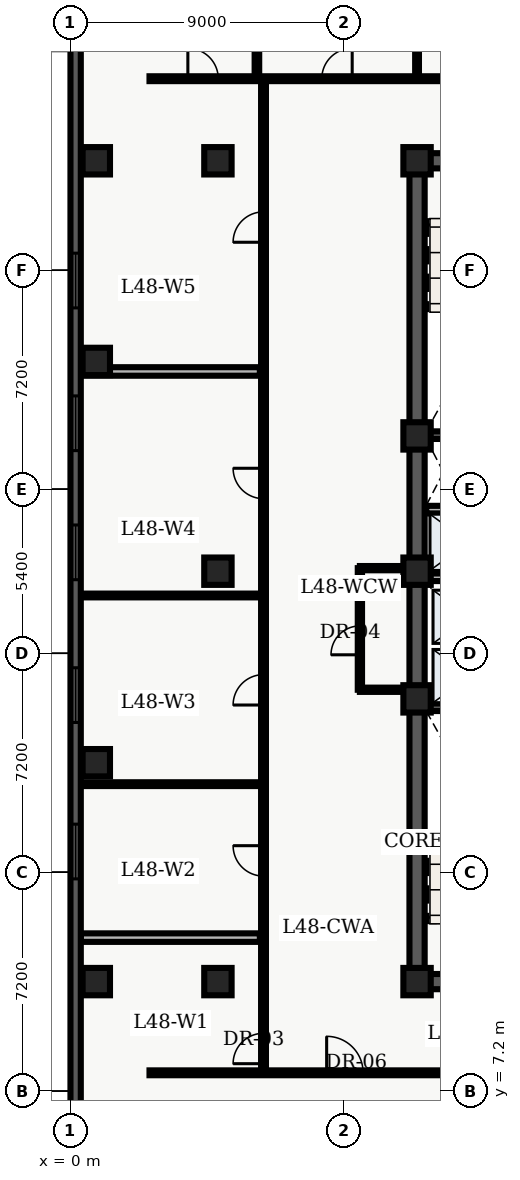
"""IFC4 building model, lengths in metres.
Left out: names, types, materials, properties, quantities, classifications, styles, units other than length and angle.
Written with IfcOpenShell. Run it as: python <this file> out.ifc"""

import sys

from ifc_helpers import new_model, entity, si_unit, converted_unit, direction, frame, origin_with_axes, origin_2d_with_axis, place, context, subcontext, project, spatial, polyline, rectangle, outline, extrude, element, fill, save


model = new_model("IFC4")
c1 = context("Model", 3, precision=1e-05, world=origin_with_axes(), true_north=direction((0.0, 1.0)))
c2 = subcontext(c1, "Body", "Model", "MODEL_VIEW")
j1 = project(units=[si_unit("LENGTHUNIT", "METRE"), converted_unit("PLANEANGLEUNIT", "DEGREE", entity("IfcPlaneAngleMeasure", 0.017), si_unit("PLANEANGLEUNIT", "RADIAN"), dimensions=[0, 0, 0, 0, 0, 0, 0])], contexts=[c1])
p1 = place(None, origin_with_axes())
s1 = spatial("IfcSite", under=j1, at=p1, CompositionType="ELEMENT")
p2 = place(p1, origin_with_axes())
s2 = spatial("IfcBuilding", under=s1, at=p2, CompositionType="ELEMENT")
p3 = place(p2, frame((0.0, 0.0, 196.5), z_axis=(0.0, 0.0, 1.0), x_axis=(1.0, 0.0, 0.0)))
s3 = spatial("IfcBuildingStorey", under=s2, at=p3, CompositionType="ELEMENT", Elevation=196.5)
p4 = place(p3, frame((11.4, 10.8, 0.0), z_axis=(0.0, 0.0, 1.0), x_axis=(0.0, 1.0, 0.0)))
e1 = element("IfcWall", 1, at=p4, inside=s3, PredefinedType="SHEAR", context=c2, shape_type="SweptSolid", body=[
    extrude(outline(polyline([(0.0, -0.25), (27.0, -0.25), (27.0, 0.25), (0.0, 0.25), (0.0, -0.25)])), origin_with_axes(), (0.0, 0.0, 1.0), 3.66),
])
p5 = place(p3, frame((11.4, 10.8, 0.0), z_axis=(0.0, 0.0, 1.0), x_axis=(1.0, 0.0, 0.0)))
e2 = element("IfcWall", 2, at=p5, inside=s3, PredefinedType="SHEAR", context=c2, shape_type="SweptSolid", body=[
    extrude(outline(polyline([(0.0, -0.25), (7.2, -0.25), (7.2, 0.25), (0.0, 0.25), (0.0, -0.25)])), origin_with_axes(), (0.0, 0.0, 1.0), 3.66),
])
p6 = place(p5, frame((2.625, 0.0, 0.0), z_axis=(0.0, 0.0, 1.0), x_axis=(1.0, 0.0, 0.0)))
e3 = element("IfcOpeningElement", 3, at=p6, cuts=e2, PredefinedType="OPENING", context=c2, shape_type="SweptSolid", body=[
    extrude(rectangle(XDim=1.05, YDim=0.52, at=origin_2d_with_axis()), origin_with_axes(), (0.0, 0.0, 1.0), 2.15),
])
p7 = place(p3, frame((11.4, 37.8, 0.0), z_axis=(0.0, 0.0, 1.0), x_axis=(1.0, 0.0, 0.0)))
e4 = element("IfcWall", 4, at=p7, inside=s3, PredefinedType="SHEAR", context=c2, shape_type="SweptSolid", body=[
    extrude(outline(polyline([(0.0, -0.25), (7.2, -0.25), (7.2, 0.25), (0.0, 0.25), (0.0, -0.25)])), origin_with_axes(), (0.0, 0.0, 1.0), 3.66),
])
p8 = place(p7, frame((2.625, 0.0, 0.0), z_axis=(0.0, 0.0, 1.0), x_axis=(1.0, 0.0, 0.0)))
e5 = element("IfcOpeningElement", 5, at=p8, cuts=e4, PredefinedType="OPENING", context=c2, shape_type="SweptSolid", body=[
    extrude(rectangle(XDim=1.05, YDim=0.52, at=origin_2d_with_axis()), origin_with_axes(), (0.0, 0.0, 1.0), 2.15),
])
for number, where, z_axis, x_axis in (
    (6, (11.65, 19.825, 0.0), (0.0, 0.0, 1.0), (1.0, 0.0, 0.0)),
    (7, (11.65, 28.775, 0.0), (0.0, 0.0, 1.0), (1.0, 0.0, 0.0)),
):
    element("IfcWall", number, at=place(p3, frame(where, z_axis=z_axis, x_axis=x_axis)), inside=s3, PredefinedType="SHEAR", context=c2, shape_type="SweptSolid", body=[
        extrude(outline(polyline([(0.0, -0.125), (6.7, -0.125), (6.7, 0.125), (0.0, 0.125), (0.0, -0.125)])), origin_with_axes(), (0.0, 0.0, 1.0), 3.66),
    ])
p9 = place(p3, frame((11.7, 24.1, 0.0), z_axis=(0.0, 0.0, 1.0), x_axis=(1.0, 0.0, 0.0)))
e8 = element("IfcWall", 8, at=p9, inside=s3, PredefinedType="SOLIDWALL", context=c2, shape_type="SweptSolid", body=[
    extrude(outline(polyline([(0.0, -0.125), (6.6, -0.125), (6.6, 0.125), (0.0, 0.125), (0.0, -0.125)])), origin_with_axes(), (0.0, 0.0, 1.0), 2.7),
])
p10 = place(p9, frame((3.75, 0.0, 0.0), z_axis=(0.0, 0.0, 1.0), x_axis=(1.0, 0.0, 0.0)))
e9 = element("IfcOpeningElement", 9, at=p10, cuts=e8, PredefinedType="OPENING", context=c2, shape_type="SweptSolid", body=[
    extrude(rectangle(XDim=0.9, YDim=0.27, at=origin_2d_with_axis()), origin_with_axes(), (0.0, 0.0, 1.0), 2.15),
])
p11 = place(p3, frame((11.7, 26.325, 0.0), z_axis=(0.0, 0.0, 1.0), x_axis=(1.0, 0.0, 0.0)))
e10 = element("IfcWall", 10, at=p11, inside=s3, PredefinedType="SOLIDWALL", context=c2, shape_type="SweptSolid", body=[
    extrude(outline(polyline([(0.0, -0.125), (6.6, -0.125), (6.6, 0.125), (0.0, 0.125), (0.0, -0.125)])), origin_with_axes(), (0.0, 0.0, 1.0), 2.7),
])
p12 = place(p11, frame((3.5, 0.0, 0.0), z_axis=(0.0, 0.0, 1.0), x_axis=(1.0, 0.0, 0.0)))
e11 = element("IfcOpeningElement", 11, at=p12, cuts=e10, PredefinedType="OPENING", context=c2, shape_type="SweptSolid", body=[
    extrude(rectangle(XDim=0.9, YDim=0.27, at=origin_2d_with_axis()), origin_with_axes(), (0.0, 0.0, 1.0), 2.15),
])
for number, where, z_axis, x_axis in (
    (12, (11.4, 10.8, 0.0), (0.0, 0.0, 1.0), (1.0, 0.0, 0.0)),
    (13, (11.4, 20.1, 0.0), (0.0, 0.0, 1.0), (1.0, 0.0, 0.0)),
    (14, (11.4, 24.3, 0.0), (0.0, 0.0, 1.0), (1.0, 0.0, 0.0)),
    (15, (11.4, 28.75, 0.0), (0.0, 0.0, 1.0), (1.0, 0.0, 0.0)),
    (16, (11.4, 37.8, 0.0), (0.0, 0.0, 1.0), (1.0, 0.0, 0.0)),
    (17, (4.85, 10.8, 0.0), (0.0, 0.0, 1.0), (1.0, 0.0, 0.0)),
    (18, (4.85, 24.3, 0.0), (0.0, 0.0, 1.0), (1.0, 0.0, 0.0)),
    (19, (4.85, 37.8, 0.0), (0.0, 0.0, 1.0), (1.0, 0.0, 0.0)),
    (20, (0.85, 10.8, 0.0), (0.0, 0.0, 1.0), (1.0, 0.0, 0.0)),
    (21, (0.85, 18.0, 0.0), (0.0, 0.0, 1.0), (1.0, 0.0, 0.0)),
    (22, (0.85, 31.2, 0.0), (0.0, 0.0, 1.0), (1.0, 0.0, 0.0)),
    (23, (0.85, 37.8, 0.0), (0.0, 0.0, 1.0), (1.0, 0.0, 0.0)),
):
    element("IfcColumn", number, at=place(p3, frame(where, z_axis=z_axis, x_axis=x_axis)), inside=s3, PredefinedType="COLUMN", context=c2, shape_type="SweptSolid", body=[
        extrude(rectangle(XDim=0.9, YDim=0.9, at=origin_2d_with_axis()), origin_with_axes(), (0.0, 0.0, 1.0), 3.9),
    ])
p13 = place(p3, frame((9.52, 20.4, 0.0), z_axis=(0.0, 0.0, 1.0), x_axis=(0.0, 1.0, 0.0)))
e24 = element("IfcWall", 24, at=p13, inside=s3, PredefinedType="PARTITIONING", context=c2, shape_type="SweptSolid", body=[
    extrude(outline(polyline([(0.0, -0.07), (4.0, -0.07), (4.0, 0.07), (0.0, 0.07), (0.0, -0.07)])), origin_with_axes(), (0.0, 0.0, 1.0), 2.7),
])
p14 = place(p13, frame((1.625, 0.0, 0.0), z_axis=(0.0, 0.0, 1.0), x_axis=(1.0, 0.0, 0.0)))
e25 = element("IfcOpeningElement", 25, at=p14, cuts=e24, PredefinedType="OPENING", context=c2, shape_type="SweptSolid", body=[
    extrude(rectangle(XDim=0.95, YDim=0.16, at=origin_2d_with_axis()), origin_with_axes(), (0.0, 0.0, 1.0), 2.15),
])
for number, where, z_axis, x_axis in (
    (26, (9.52, 20.4, 0.0), (0.0, 0.0, 1.0), (1.0, 0.0, 0.0)),
    (27, (9.52, 24.4, 0.0), (0.0, 0.0, 1.0), (1.0, 0.0, 0.0)),
):
    element("IfcWall", number, at=place(p3, frame(where, z_axis=z_axis, x_axis=x_axis)), inside=s3, PredefinedType="PARTITIONING", context=c2, shape_type="SweptSolid", body=[
        extrude(outline(polyline([(0.0, -0.07), (1.58, -0.07), (1.58, 0.07), (0.0, 0.07), (0.0, -0.07)])), origin_with_axes(), (0.0, 0.0, 1.0), 2.7),
    ])
p15 = place(p3, frame((2.6, 7.8, 0.0), z_axis=(0.0, 0.0, 1.0), x_axis=(1.0, 0.0, 0.0)))
e28 = element("IfcWall", 28, at=p15, inside=s3, PredefinedType="PARTITIONING", context=c2, shape_type="SweptSolid", body=[
    extrude(outline(polyline([(0.0, -0.08), (18.55, -0.08), (18.55, 0.08), (0.0, 0.08), (0.0, -0.08)])), origin_with_axes(), (0.0, 0.0, 1.0), 2.7),
])
p16 = place(p15, frame((6.426, 0.0, 0.0), z_axis=(0.0, 0.0, 1.0), x_axis=(1.0, 0.0, 0.0)))
e29 = element("IfcOpeningElement", 29, at=p16, cuts=e28, PredefinedType="OPENING", context=c2, shape_type="SweptSolid", body=[
    extrude(rectangle(XDim=1.2, YDim=0.18, at=origin_2d_with_axis()), origin_with_axes(), (0.0, 0.0, 1.0), 2.2),
])
p17 = place(p15, frame((15.681, 0.0, 0.0), z_axis=(0.0, 0.0, 1.0), x_axis=(1.0, 0.0, 0.0)))
e30 = element("IfcOpeningElement", 30, at=p17, cuts=e28, PredefinedType="OPENING", context=c2, shape_type="SweptSolid", body=[
    extrude(rectangle(XDim=1.0, YDim=0.18, at=origin_2d_with_axis()), origin_with_axes(), (0.0, 0.0, 1.0), 2.15),
])
p18 = place(p3, frame((2.6, 40.5, 0.0), z_axis=(0.0, 0.0, 1.0), x_axis=(1.0, 0.0, 0.0)))
e31 = element("IfcWall", 31, at=p18, inside=s3, PredefinedType="PARTITIONING", context=c2, shape_type="SweptSolid", body=[
    extrude(outline(polyline([(0.0, -0.08), (25.444, -0.08), (25.444, 0.08), (0.0, 0.08), (0.0, -0.08)])), origin_with_axes(), (0.0, 0.0, 1.0), 2.7),
])
p19 = place(p18, frame((1.762, 0.0, 0.0), z_axis=(0.0, 0.0, 1.0), x_axis=(1.0, 0.0, 0.0)))
e32 = element("IfcOpeningElement", 32, at=p19, cuts=e31, PredefinedType="OPENING", context=c2, shape_type="SweptSolid", body=[
    extrude(rectangle(XDim=1.0, YDim=0.18, at=origin_2d_with_axis()), origin_with_axes(), (0.0, 0.0, 1.0), 2.15),
])
p20 = place(p18, frame((6.167, 0.0, 0.0), z_axis=(0.0, 0.0, 1.0), x_axis=(1.0, 0.0, 0.0)))
e33 = element("IfcOpeningElement", 33, at=p20, cuts=e31, PredefinedType="OPENING", context=c2, shape_type="SweptSolid", body=[
    extrude(rectangle(XDim=1.0, YDim=0.18, at=origin_2d_with_axis()), origin_with_axes(), (0.0, 0.0, 1.0), 2.15),
])
p21 = place(p18, frame((10.413, 0.0, 0.0), z_axis=(0.0, 0.0, 1.0), x_axis=(1.0, 0.0, 0.0)))
e34 = element("IfcOpeningElement", 34, at=p21, cuts=e31, PredefinedType="OPENING", context=c2, shape_type="SweptSolid", body=[
    extrude(rectangle(XDim=1.0, YDim=0.18, at=origin_2d_with_axis()), origin_with_axes(), (0.0, 0.0, 1.0), 2.15),
])
p22 = place(p18, frame((14.773, 0.0, 0.0), z_axis=(0.0, 0.0, 1.0), x_axis=(1.0, 0.0, 0.0)))
e35 = element("IfcOpeningElement", 35, at=p22, cuts=e31, PredefinedType="OPENING", context=c2, shape_type="SweptSolid", body=[
    extrude(rectangle(XDim=1.0, YDim=0.18, at=origin_2d_with_axis()), origin_with_axes(), (0.0, 0.0, 1.0), 2.15),
])
p23 = place(p3, frame((6.35, 7.8, 0.0), z_axis=(0.0, 0.0, 1.0), x_axis=(0.0, 1.0, 0.0)))
e36 = element("IfcWall", 36, at=p23, inside=s3, PredefinedType="PARTITIONING", context=c2, shape_type="SweptSolid", body=[
    extrude(outline(polyline([(0.0, -0.08), (32.7, -0.08), (32.7, 0.08), (0.0, 0.08), (0.0, -0.08)])), origin_with_axes(), (0.0, 0.0, 1.0), 2.7),
])
p24 = place(p23, frame((0.8, 0.0, 0.0), z_axis=(0.0, 0.0, 1.0), x_axis=(1.0, 0.0, 0.0)))
e37 = element("IfcOpeningElement", 37, at=p24, cuts=e36, PredefinedType="OPENING", context=c2, shape_type="SweptSolid", body=[
    extrude(rectangle(XDim=1.0, YDim=0.18, at=origin_2d_with_axis()), origin_with_axes(), (0.0, 0.0, 1.0), 2.15),
])
p25 = place(p23, frame((6.971, 0.0, 0.0), z_axis=(0.0, 0.0, 1.0), x_axis=(1.0, 0.0, 0.0)))
e38 = element("IfcOpeningElement", 38, at=p25, cuts=e36, PredefinedType="OPENING", context=c2, shape_type="SweptSolid", body=[
    extrude(rectangle(XDim=1.0, YDim=0.18, at=origin_2d_with_axis()), origin_with_axes(), (0.0, 0.0, 1.0), 2.15),
])
p26 = place(p23, frame((12.598, 0.0, 0.0), z_axis=(0.0, 0.0, 1.0), x_axis=(1.0, 0.0, 0.0)))
e39 = element("IfcOpeningElement", 39, at=p26, cuts=e36, PredefinedType="OPENING", context=c2, shape_type="SweptSolid", body=[
    extrude(rectangle(XDim=1.0, YDim=0.18, at=origin_2d_with_axis()), origin_with_axes(), (0.0, 0.0, 1.0), 2.15),
])
p27 = place(p23, frame((19.386, 0.0, 0.0), z_axis=(0.0, 0.0, 1.0), x_axis=(1.0, 0.0, 0.0)))
e40 = element("IfcOpeningElement", 40, at=p27, cuts=e36, PredefinedType="OPENING", context=c2, shape_type="SweptSolid", body=[
    extrude(rectangle(XDim=1.0, YDim=0.18, at=origin_2d_with_axis()), origin_with_axes(), (0.0, 0.0, 1.0), 2.15),
])
p28 = place(p23, frame((27.82, 0.0, 0.0), z_axis=(0.0, 0.0, 1.0), x_axis=(1.0, 0.0, 0.0)))
e41 = element("IfcOpeningElement", 41, at=p28, cuts=e36, PredefinedType="OPENING", context=c2, shape_type="SweptSolid", body=[
    extrude(rectangle(XDim=1.0, YDim=0.18, at=origin_2d_with_axis()), origin_with_axes(), (0.0, 0.0, 1.0), 2.15),
])
p29 = place(p3, frame((0.335, 12.247, 0.0), z_axis=(0.0, 0.0, 1.0), x_axis=(1.0, 0.0, 0.0)))
e42 = element("IfcWall", 42, at=p29, inside=s3, PredefinedType="PARTITIONING", context=c2, shape_type="SweptSolid", body=[
    extrude(outline(polyline([(0.0, -0.14), (5.895, -0.14), (5.895, 0.14), (0.0, 0.14), (0.0, -0.14)])), origin_with_axes(), (0.0, 0.0, 1.0), 2.7),
])
for number, where, z_axis, x_axis in (
    (43, (0.335, 17.295, 0.0), (0.0, 0.0, 1.0), (1.0, 0.0, 0.0)),
    (44, (0.335, 23.501, 0.0), (0.0, 0.0, 1.0), (1.0, 0.0, 0.0)),
):
    element("IfcWall", number, at=place(p3, frame(where, z_axis=z_axis, x_axis=x_axis)), inside=s3, PredefinedType="PARTITIONING", context=c2, shape_type="SweptSolid", body=[
        extrude(outline(polyline([(0.0, -0.062), (5.895, -0.062), (5.895, 0.062), (0.0, 0.062), (0.0, -0.062)])), origin_with_axes(), (0.0, 0.0, 1.0), 2.7),
    ])
p30 = place(p3, frame((0.335, 30.87, 0.0), z_axis=(0.0, 0.0, 1.0), x_axis=(1.0, 0.0, 0.0)))
e45 = element("IfcWall", 45, at=p30, inside=s3, PredefinedType="PARTITIONING", context=c2, shape_type="SweptSolid", body=[
    extrude(outline(polyline([(0.0, -0.14), (5.895, -0.14), (5.895, 0.14), (0.0, 0.14), (0.0, -0.14)])), origin_with_axes(), (0.0, 0.0, 1.0), 2.7),
])
p31 = place(p3, frame((6.133, 40.6, 0.0), z_axis=(0.0, 0.0, 1.0), x_axis=(0.0, 1.0, 0.0)))
e46 = element("IfcWall", 46, at=p31, inside=s3, PredefinedType="PARTITIONING", context=c2, shape_type="SweptSolid", body=[
    extrude(outline(polyline([(0.0, -0.075), (7.665, -0.075), (7.665, 0.075), (0.0, 0.075), (0.0, -0.075)])), origin_with_axes(), (0.0, 0.0, 1.0), 2.7),
])
p32 = place(p3, frame((11.4, 40.6, 0.0), z_axis=(0.0, 0.0, 1.0), x_axis=(0.0, 1.0, 0.0)))
e47 = element("IfcWall", 47, at=p32, inside=s3, PredefinedType="PARTITIONING", context=c2, shape_type="SweptSolid", body=[
    extrude(outline(polyline([(0.0, -0.062), (7.665, -0.062), (7.665, 0.062), (0.0, 0.062), (0.0, -0.062)])), origin_with_axes(), (0.0, 0.0, 1.0), 2.7),
])
p33 = place(p3, frame((0.17, 2.74, 0.0), z_axis=(0.0, 0.0, 1.0), x_axis=(0.0, 1.0, 0.0)))
e48 = element("IfcWall", 48, at=p33, inside=s3, PredefinedType="SOLIDWALL", context=c2, shape_type="SweptSolid", body=[
    extrude(outline(polyline([(0.0, -0.17), (43.46, -0.17), (43.46, 0.17), (0.0, 0.17), (0.0, -0.17)])), origin_with_axes(), (0.0, 0.0, 1.0), 3.66),
])
p34 = place(p33, frame((2.948, 0.0, 0.45), z_axis=(0.0, 0.0, 1.0), x_axis=(1.0, 0.0, 0.0)))
e49 = element("IfcOpeningElement", 49, at=p34, cuts=e48, PredefinedType="OPENING", context=c2, shape_type="SweptSolid", body=[
    extrude(rectangle(XDim=1.8, YDim=0.36, at=origin_2d_with_axis()), origin_with_axes(), (0.0, 0.0, 1.0), 2.1),
])
p35 = place(p33, frame((12.339, 0.0, 0.45), z_axis=(0.0, 0.0, 1.0), x_axis=(1.0, 0.0, 0.0)))
e50 = element("IfcOpeningElement", 50, at=p35, cuts=e48, PredefinedType="OPENING", context=c2, shape_type="SweptSolid", body=[
    extrude(rectangle(XDim=1.8, YDim=0.36, at=origin_2d_with_axis()), origin_with_axes(), (0.0, 0.0, 1.0), 2.1),
])
p36 = place(p33, frame((17.484, 0.0, 0.45), z_axis=(0.0, 0.0, 1.0), x_axis=(1.0, 0.0, 0.0)))
e51 = element("IfcOpeningElement", 51, at=p36, cuts=e48, PredefinedType="OPENING", context=c2, shape_type="SweptSolid", body=[
    extrude(rectangle(XDim=1.8, YDim=0.36, at=origin_2d_with_axis()), origin_with_axes(), (0.0, 0.0, 1.0), 2.1),
])
p37 = place(p33, frame((22.18, 0.0, 0.45), z_axis=(0.0, 0.0, 1.0), x_axis=(1.0, 0.0, 0.0)))
e52 = element("IfcOpeningElement", 52, at=p37, cuts=e48, PredefinedType="OPENING", context=c2, shape_type="SweptSolid", body=[
    extrude(rectangle(XDim=1.8, YDim=0.36, at=origin_2d_with_axis()), origin_with_axes(), (0.0, 0.0, 1.0), 2.1),
])
p38 = place(p33, frame((26.426, 0.0, 0.45), z_axis=(0.0, 0.0, 1.0), x_axis=(1.0, 0.0, 0.0)))
e53 = element("IfcOpeningElement", 53, at=p38, cuts=e48, PredefinedType="OPENING", context=c2, shape_type="SweptSolid", body=[
    extrude(rectangle(XDim=1.8, YDim=0.36, at=origin_2d_with_axis()), origin_with_axes(), (0.0, 0.0, 1.0), 2.1),
])
p39 = place(p33, frame((31.121, 0.0, 0.45), z_axis=(0.0, 0.0, 1.0), x_axis=(1.0, 0.0, 0.0)))
e54 = element("IfcOpeningElement", 54, at=p39, cuts=e48, PredefinedType="OPENING", context=c2, shape_type="SweptSolid", body=[
    extrude(rectangle(XDim=1.8, YDim=0.36, at=origin_2d_with_axis()), origin_with_axes(), (0.0, 0.0, 1.0), 2.1),
])
p40 = place(p33, frame((40.062, 0.0, 0.45), z_axis=(0.0, 0.0, 1.0), x_axis=(1.0, 0.0, 0.0)))
e55 = element("IfcOpeningElement", 55, at=p40, cuts=e48, PredefinedType="OPENING", context=c2, shape_type="SweptSolid", body=[
    extrude(rectangle(XDim=1.8, YDim=0.36, at=origin_2d_with_axis()), origin_with_axes(), (0.0, 0.0, 1.0), 2.1),
])
p41 = place(p13, frame((1.625, 0.0, 0.0), z_axis=(0.0, 0.0, 1.0), x_axis=(1.0, 0.0, 0.0)))
e56 = element("IfcDoor", 56, at=p41, inside=s3, OperationType="SINGLE_SWING_LEFT", PredefinedType="DOOR", context=c2, shape_type="SweptSolid", body=[
    extrude(rectangle(XDim=0.95, YDim=0.084, at=origin_2d_with_axis()), origin_with_axes(), (0.0, 0.0, 1.0), 2.15),
])
fill(e25, e56)
p42 = place(p23, frame((0.8, 0.0, 0.0), z_axis=(0.0, 0.0, 1.0), x_axis=(1.0, 0.0, 0.0)))
e57 = element("IfcDoor", 57, at=p42, inside=s3, OperationType="SINGLE_SWING_LEFT", PredefinedType="DOOR", context=c2, shape_type="SweptSolid", body=[
    extrude(rectangle(XDim=1.0, YDim=0.09, at=origin_2d_with_axis()), origin_with_axes(), (0.0, 0.0, 1.0), 2.15),
])
fill(e37, e57)
p43 = place(p23, frame((6.971, 0.0, 0.0), z_axis=(0.0, 0.0, 1.0), x_axis=(1.0, 0.0, 0.0)))
e58 = element("IfcDoor", 58, at=p43, inside=s3, OperationType="SINGLE_SWING_RIGHT", PredefinedType="DOOR", context=c2, shape_type="SweptSolid", body=[
    extrude(rectangle(XDim=1.0, YDim=0.09, at=origin_2d_with_axis()), origin_with_axes(), (0.0, 0.0, 1.0), 2.15),
])
fill(e38, e58)
p44 = place(p23, frame((12.598, 0.0, 0.0), z_axis=(0.0, 0.0, 1.0), x_axis=(1.0, 0.0, 0.0)))
e59 = element("IfcDoor", 59, at=p44, inside=s3, OperationType="SINGLE_SWING_LEFT", PredefinedType="DOOR", context=c2, shape_type="SweptSolid", body=[
    extrude(rectangle(XDim=1.0, YDim=0.09, at=origin_2d_with_axis()), origin_with_axes(), (0.0, 0.0, 1.0), 2.15),
])
fill(e39, e59)
p45 = place(p23, frame((19.386, 0.0, 0.0), z_axis=(0.0, 0.0, 1.0), x_axis=(1.0, 0.0, 0.0)))
e60 = element("IfcDoor", 60, at=p45, inside=s3, OperationType="SINGLE_SWING_RIGHT", PredefinedType="DOOR", context=c2, shape_type="SweptSolid", body=[
    extrude(rectangle(XDim=1.0, YDim=0.09, at=origin_2d_with_axis()), origin_with_axes(), (0.0, 0.0, 1.0), 2.15),
])
fill(e40, e60)
p46 = place(p23, frame((27.82, 0.0, 0.0), z_axis=(0.0, 0.0, 1.0), x_axis=(1.0, 0.0, 0.0)))
e61 = element("IfcDoor", 61, at=p46, inside=s3, OperationType="SINGLE_SWING_LEFT", PredefinedType="DOOR", context=c2, shape_type="SweptSolid", body=[
    extrude(rectangle(XDim=1.0, YDim=0.09, at=origin_2d_with_axis()), origin_with_axes(), (0.0, 0.0, 1.0), 2.15),
])
fill(e41, e61)
p47 = place(p15, frame((6.426, 0.0, 0.0), z_axis=(0.0, 0.0, 1.0), x_axis=(1.0, 0.0, 0.0)))
e62 = element("IfcDoor", 62, at=p47, inside=s3, OperationType="SINGLE_SWING_LEFT", PredefinedType="DOOR", context=c2, shape_type="SweptSolid", body=[
    extrude(rectangle(XDim=1.2, YDim=0.09, at=origin_2d_with_axis()), origin_with_axes(), (0.0, 0.0, 1.0), 2.2),
])
fill(e29, e62)
p48 = place(p18, frame((1.762, 0.0, 0.0), z_axis=(0.0, 0.0, 1.0), x_axis=(1.0, 0.0, 0.0)))
e63 = element("IfcDoor", 63, at=p48, inside=s3, OperationType="SINGLE_SWING_LEFT", PredefinedType="DOOR", context=c2, shape_type="SweptSolid", body=[
    extrude(rectangle(XDim=1.0, YDim=0.09, at=origin_2d_with_axis()), origin_with_axes(), (0.0, 0.0, 1.0), 2.15),
])
fill(e32, e63)
p49 = place(p18, frame((6.167, 0.0, 0.0), z_axis=(0.0, 0.0, 1.0), x_axis=(1.0, 0.0, 0.0)))
e64 = element("IfcDoor", 64, at=p49, inside=s3, OperationType="SINGLE_SWING_RIGHT", PredefinedType="DOOR", context=c2, shape_type="SweptSolid", body=[
    extrude(rectangle(XDim=1.0, YDim=0.09, at=origin_2d_with_axis()), origin_with_axes(), (0.0, 0.0, 1.0), 2.15),
])
fill(e33, e64)
p50 = place(p33, frame((12.339, 0.0, 0.45), z_axis=(0.0, 0.0, 1.0), x_axis=(1.0, 0.0, 0.0)))
e65 = element("IfcWindow", 65, at=p50, inside=s3, PredefinedType="WINDOW", context=c2, shape_type="SweptSolid", body=[
    extrude(rectangle(XDim=1.8, YDim=0.09, at=origin_2d_with_axis()), origin_with_axes(), (0.0, 0.0, 1.0), 2.1),
])
fill(e50, e65)
p51 = place(p33, frame((17.484, 0.0, 0.45), z_axis=(0.0, 0.0, 1.0), x_axis=(1.0, 0.0, 0.0)))
e66 = element("IfcWindow", 66, at=p51, inside=s3, PredefinedType="WINDOW", context=c2, shape_type="SweptSolid", body=[
    extrude(rectangle(XDim=1.8, YDim=0.09, at=origin_2d_with_axis()), origin_with_axes(), (0.0, 0.0, 1.0), 2.1),
])
fill(e51, e66)
p52 = place(p33, frame((22.18, 0.0, 0.45), z_axis=(0.0, 0.0, 1.0), x_axis=(1.0, 0.0, 0.0)))
e67 = element("IfcWindow", 67, at=p52, inside=s3, PredefinedType="WINDOW", context=c2, shape_type="SweptSolid", body=[
    extrude(rectangle(XDim=1.8, YDim=0.09, at=origin_2d_with_axis()), origin_with_axes(), (0.0, 0.0, 1.0), 2.1),
])
fill(e52, e67)
p53 = place(p33, frame((26.426, 0.0, 0.45), z_axis=(0.0, 0.0, 1.0), x_axis=(1.0, 0.0, 0.0)))
e68 = element("IfcWindow", 68, at=p53, inside=s3, PredefinedType="WINDOW", context=c2, shape_type="SweptSolid", body=[
    extrude(rectangle(XDim=1.8, YDim=0.09, at=origin_2d_with_axis()), origin_with_axes(), (0.0, 0.0, 1.0), 2.1),
])
fill(e53, e68)
p54 = place(p33, frame((31.121, 0.0, 0.45), z_axis=(0.0, 0.0, 1.0), x_axis=(1.0, 0.0, 0.0)))
e69 = element("IfcWindow", 69, at=p54, inside=s3, PredefinedType="WINDOW", context=c2, shape_type="SweptSolid", body=[
    extrude(rectangle(XDim=1.8, YDim=0.09, at=origin_2d_with_axis()), origin_with_axes(), (0.0, 0.0, 1.0), 2.1),
])
fill(e54, e69)
save(model, sys.argv[1])
